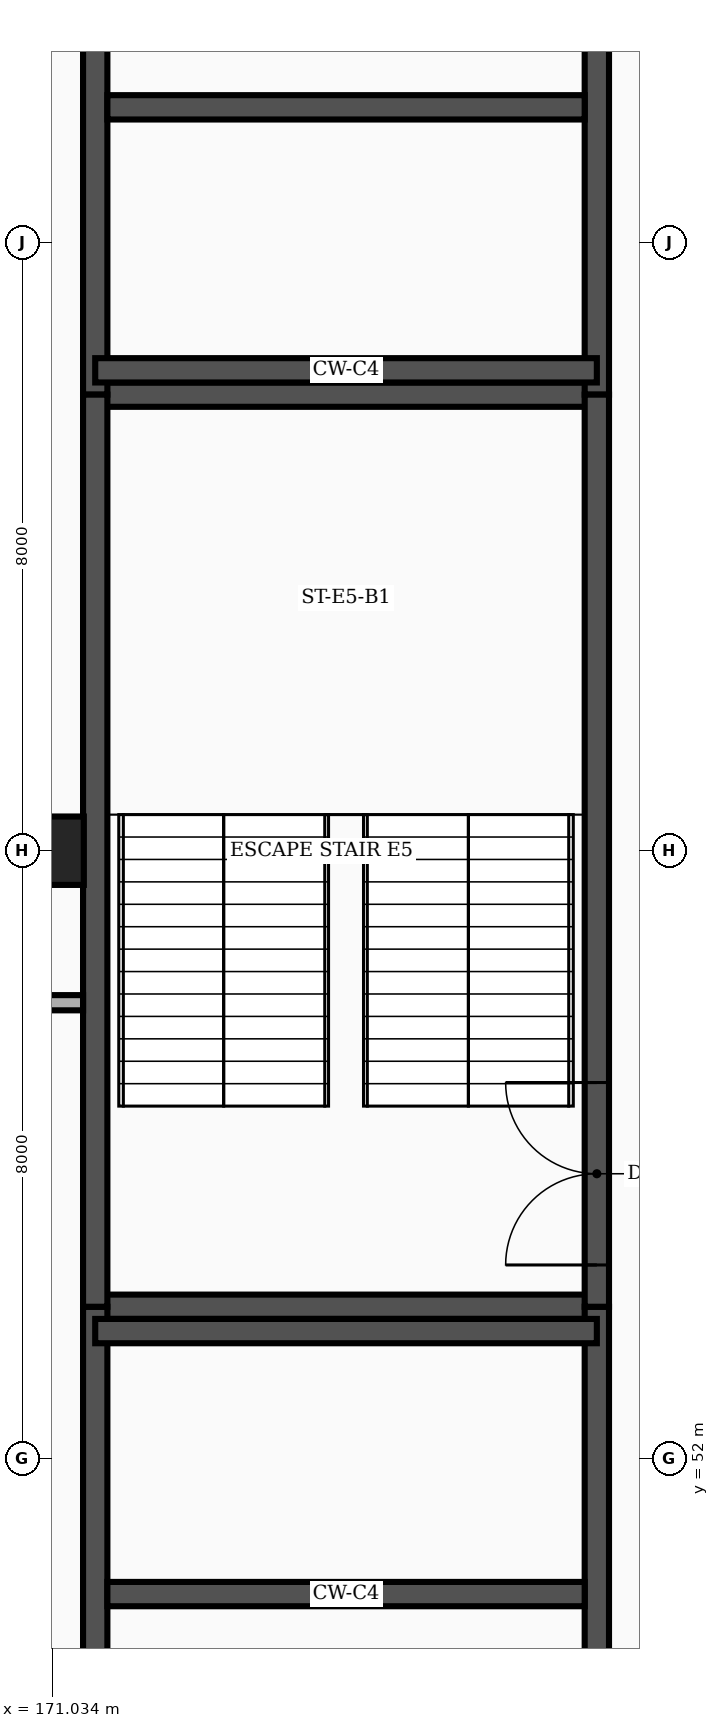
"""IFC4 building model, lengths in metres.
Left out: names, types, materials, properties, quantities, classifications, styles, units other than length and angle.
Written with IfcOpenShell. Run it as: python <this file> out.ifc"""

import sys

from ifc_helpers import new_model, si_unit, direction, frame, frame_2d, origin, origin_2d, place, context, subcontext, project, spatial, rectangle, extrude, element, fill, save


model = new_model("IFC4")
c1 = context("Model", 3, precision=1e-05, world=origin(), true_north=direction((0.0, 1.0)))
c2 = subcontext(c1, "Body", "Model", "MODEL_VIEW")
j1 = project(units=[si_unit("LENGTHUNIT", "METRE"), si_unit("PLANEANGLEUNIT", "RADIAN")], contexts=[c1])
p1 = place(None, origin())
s1 = spatial("IfcSite", under=j1, at=p1, CompositionType="ELEMENT")
p2 = place(p1, origin())
s2 = spatial("IfcBuilding", under=s1, at=p2, CompositionType="ELEMENT")
p3 = place(p2, frame((0.0, 0.0, -4.5)))
s3 = spatial("IfcBuildingStorey", under=s2, at=p3, CompositionType="ELEMENT", Elevation=-4.5)
p4 = place(p3, frame((171.0, 60.0, -0.45), z_axis=(0.0, 0.0, 1.0), x_axis=(1.0, 0.0, 0.0)))
e1 = element("IfcColumn", 1, at=p4, inside=s3, PredefinedType="COLUMN", context=c2, shape_type="SweptSolid", body=[
    extrude(rectangle(XDim=0.9, YDim=0.9, at=origin_2d()), origin(), (0.0, 0.0, 1.0), 4.95),
])
p5 = place(p3, frame((171.6, 54.0, 0.0), z_axis=(0.0, 0.0, 1.0), x_axis=(1.0, 0.0, 0.0)))
e2 = element("IfcWall", 2, at=p5, inside=s3, PredefinedType="SHEAR", context=c2, shape_type="SweptSolid", body=[
    extrude(rectangle(XDim=6.6, YDim=0.32, at=frame_2d((3.3, 0.0))), origin(), (0.0, 0.0, 1.0), 4.24),
])
p6 = place(p3, frame((171.6, 39.4, 0.0), z_axis=(0.0, 0.0, 1.0), x_axis=(0.0, 1.0, 0.0)))
e3 = element("IfcWall", 3, at=p6, inside=s3, PredefinedType="SHEAR", context=c2, shape_type="SweptSolid", body=[
    extrude(rectangle(XDim=14.6, YDim=0.32, at=frame_2d((7.3, 0.0))), origin(), (0.0, 0.0, 1.0), 4.24),
])
p7 = place(p3, frame((178.2, 39.4, 0.0), z_axis=(0.0, 0.0, 1.0), x_axis=(0.0, 1.0, 0.0)))
e4 = element("IfcWall", 4, at=p7, inside=s3, PredefinedType="SHEAR", context=c2, shape_type="SweptSolid", body=[
    extrude(rectangle(XDim=14.6, YDim=0.32, at=frame_2d((7.3, 0.0))), origin(), (0.0, 0.0, 1.0), 4.24),
])
p8 = place(p7, frame((0.55, 0.0, 0.0)))
e5 = element("IfcOpeningElement", 5, at=p8, cuts=e4, PredefinedType="OPENING", context=c2, shape_type="SweptSolid", body=[
    extrude(rectangle(XDim=2.4, YDim=2.25, at=frame_2d((1.2, 1.125))), frame((0.0, 0.172, 0.0), z_axis=(0.0, -1.0, 0.0), x_axis=(1.0, 0.0, 0.0)), (0.0, 0.0, 1.0), 0.344),
])
p9 = place(p3, frame((171.76, 50.22, 0.0), z_axis=(0.0, 0.0, 1.0), x_axis=(1.0, 0.0, 0.0)))
e6 = element("IfcWall", 6, at=p9, inside=s3, PredefinedType="SHEAR", context=c2, shape_type="SweptSolid", body=[
    extrude(rectangle(XDim=6.28, YDim=0.32, at=frame_2d((3.14, 0.0))), origin(), (0.0, 0.0, 1.0), 4.24),
])
p10 = place(p3, frame((171.6, 66.0, 0.0), z_axis=(0.0, 0.0, 1.0), x_axis=(1.0, 0.0, 0.0)))
e7 = element("IfcWall", 7, at=p10, inside=s3, PredefinedType="SHEAR", context=c2, shape_type="SweptSolid", body=[
    extrude(rectangle(XDim=6.6, YDim=0.32, at=frame_2d((3.3, 0.0))), origin(), (0.0, 0.0, 1.0), 4.24),
])
p11 = place(p3, frame((171.6, 66.0, 0.0), z_axis=(0.0, 0.0, 1.0), x_axis=(0.0, 1.0, 0.0)))
e8 = element("IfcWall", 8, at=p11, inside=s3, PredefinedType="SHEAR", context=c2, shape_type="SweptSolid", body=[
    extrude(rectangle(XDim=14.6, YDim=0.32, at=frame_2d((7.3, 0.0))), origin(), (0.0, 0.0, 1.0), 4.24),
])
p12 = place(p3, frame((178.2, 66.0, 0.0), z_axis=(0.0, 0.0, 1.0), x_axis=(0.0, 1.0, 0.0)))
e9 = element("IfcWall", 9, at=p12, inside=s3, PredefinedType="SHEAR", context=c2, shape_type="SweptSolid", body=[
    extrude(rectangle(XDim=14.6, YDim=0.32, at=frame_2d((7.3, 0.0))), origin(), (0.0, 0.0, 1.0), 4.24),
])
p13 = place(p12, frame((11.65, 0.0, 0.0)))
e10 = element("IfcOpeningElement", 10, at=p13, cuts=e9, PredefinedType="OPENING", context=c2, shape_type="SweptSolid", body=[
    extrude(rectangle(XDim=2.4, YDim=2.25, at=frame_2d((1.2, 1.125))), frame((0.0, 0.172, 0.0), z_axis=(0.0, -1.0, 0.0), x_axis=(1.0, 0.0, 0.0)), (0.0, 0.0, 1.0), 0.344),
])
p14 = place(p3, frame((171.76, 69.78, 0.0), z_axis=(0.0, 0.0, 1.0), x_axis=(1.0, 0.0, 0.0)))
e11 = element("IfcWall", 11, at=p14, inside=s3, PredefinedType="SHEAR", context=c2, shape_type="SweptSolid", body=[
    extrude(rectangle(XDim=6.28, YDim=0.32, at=frame_2d((3.14, 0.0))), origin(), (0.0, 0.0, 1.0), 4.24),
])
for number, where, z_axis, x_axis in (
    (12, (171.6, 53.68, 0.0), (0.0, 0.0, 1.0), (1.0, 0.0, 0.0)),
    (13, (171.6, 66.32, 0.0), (0.0, 0.0, 1.0), (1.0, 0.0, 0.0)),
):
    element("IfcWall", number, at=place(p3, frame(where, z_axis=z_axis, x_axis=x_axis)), inside=s3, PredefinedType="SHEAR", context=c2, shape_type="SweptSolid", body=[
        extrude(rectangle(XDim=6.6, YDim=0.32, at=frame_2d((3.3, 0.0))), origin(), (0.0, 0.0, 1.0), 4.24),
    ])
p15 = place(p3, frame((171.6, 54.0, 0.0), z_axis=(0.0, 0.0, 1.0), x_axis=(0.0, 1.0, 0.0)))
e14 = element("IfcWall", 14, at=p15, inside=s3, PredefinedType="SHEAR", context=c2, shape_type="SweptSolid", body=[
    extrude(rectangle(XDim=12.0, YDim=0.32, at=frame_2d((6.0, 0.0))), origin(), (0.0, 0.0, 1.0), 4.24),
])
p16 = place(p3, frame((178.2, 54.0, 0.0), z_axis=(0.0, 0.0, 1.0), x_axis=(0.0, 1.0, 0.0)))
e15 = element("IfcWall", 15, at=p16, inside=s3, PredefinedType="SHEAR", context=c2, shape_type="SweptSolid", body=[
    extrude(rectangle(XDim=12.0, YDim=0.32, at=frame_2d((6.0, 0.0))), origin(), (0.0, 0.0, 1.0), 4.24),
])
p17 = place(p16, frame((0.55, 0.0, 0.0)))
e16 = element("IfcOpeningElement", 16, at=p17, cuts=e15, PredefinedType="OPENING", context=c2, shape_type="SweptSolid", body=[
    extrude(rectangle(XDim=2.4, YDim=2.25, at=frame_2d((1.2, 1.125))), frame((0.0, 0.172, 0.0), z_axis=(0.0, -1.0, 0.0), x_axis=(1.0, 0.0, 0.0)), (0.0, 0.0, 1.0), 0.344),
])
p18 = place(p3, frame((153.085, 58.0, 0.0), z_axis=(0.0, 0.0, 1.0), x_axis=(1.0, 0.0, 0.0)))
e17 = element("IfcWall", 17, at=p18, inside=s3, PredefinedType="PARTITIONING", context=c2, shape_type="SweptSolid", body=[
    extrude(rectangle(XDim=18.355, YDim=0.2, at=frame_2d((9.177, 0.0))), origin(), (0.0, 0.0, 1.0), 4.24),
])
p19 = place(p17, origin())
e18 = element("IfcDoor", 18, at=p19, inside=s3, OperationType="DOUBLE_DOOR_SINGLE_SWING", PredefinedType="DOOR", context=c2, shape_type="SweptSolid", body=[
    extrude(rectangle(XDim=2.4, YDim=2.25, at=frame_2d((1.2, 1.125))), frame((0.0, 0.025, 0.0), z_axis=(0.0, -1.0, 0.0), x_axis=(1.0, 0.0, 0.0)), (0.0, 0.0, 1.0), 0.05),
])
fill(e16, e18)
save(model, sys.argv[1])
